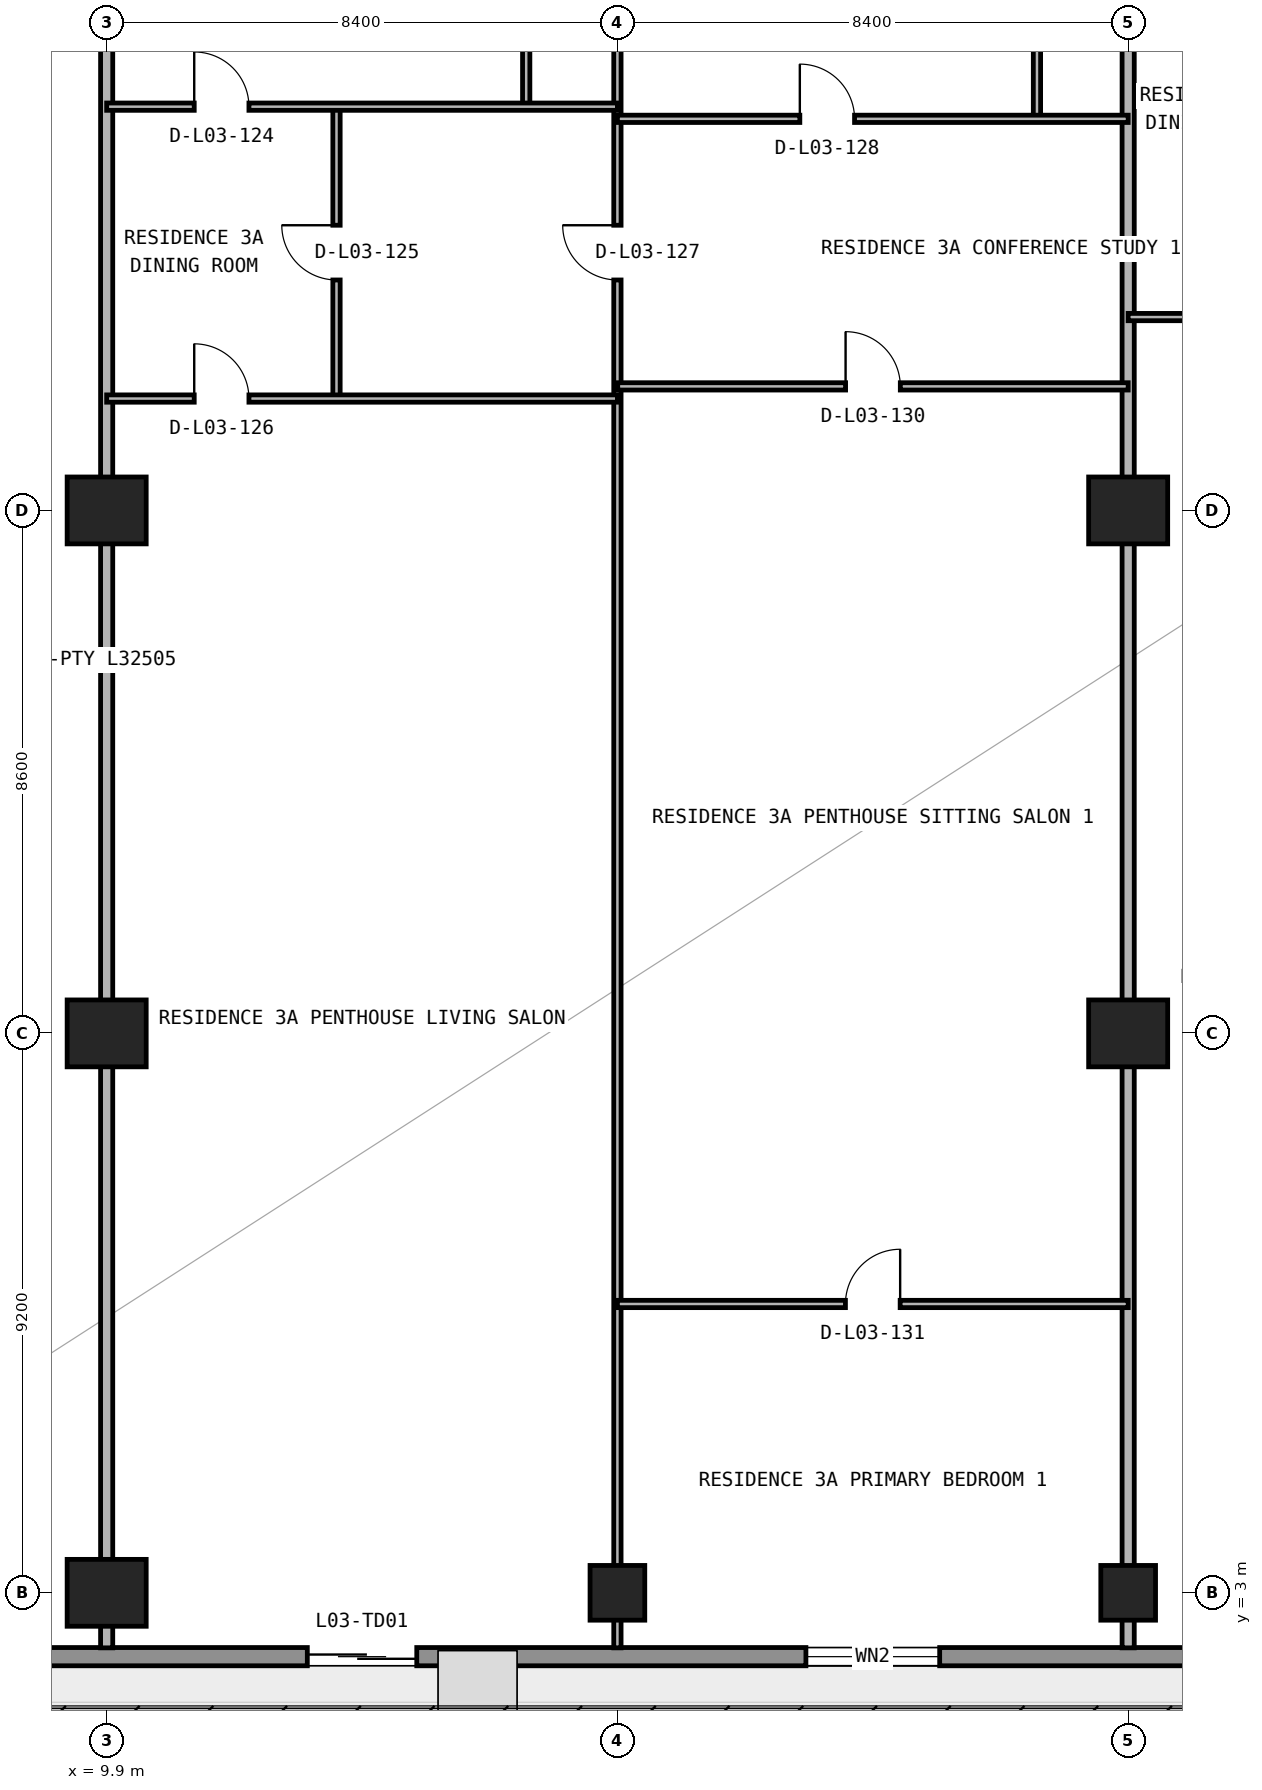
"""IFC4 building model, lengths in metres.
Left out: names, types, materials, properties, quantities, classifications, styles, units other than length and angle.
Written with IfcOpenShell. Run it as: python <this file> out.ifc"""

import sys

from ifc_helpers import new_model, si_unit, direction, frame, frame_2d, origin, origin_2d, place, context, subcontext, project, spatial, rectangle, circle, extrude, element, fill, save


model = new_model("IFC4")
c1 = context("Model", 3, precision=1e-05, world=origin(), true_north=direction((0.0, 1.0)))
c2 = subcontext(c1, "Body", "Model", "MODEL_VIEW")
j1 = project(units=[si_unit("LENGTHUNIT", "METRE"), si_unit("PLANEANGLEUNIT", "RADIAN")], contexts=[c1])
p1 = place(None, origin())
s1 = spatial("IfcSite", under=j1, at=p1, CompositionType="ELEMENT")
p2 = place(p1, origin())
s2 = spatial("IfcBuilding", under=s1, at=p2, CompositionType="ELEMENT")
p3 = place(p2, frame((0.0, 0.0, 15.0)))
s3 = spatial("IfcBuildingStorey", under=s2, at=p3, CompositionType="ELEMENT", Elevation=15.0)
p4 = place(p3, frame((9.9, 3.0, 0.0), z_axis=(0.0, 0.0, 1.0), x_axis=(1.0, 0.0, 0.0)))
e1 = element("IfcColumn", 1, at=p4, inside=s3, PredefinedType="COLUMN", context=c2, shape_type="SweptSolid", body=[
    extrude(rectangle(XDim=1.3, YDim=1.1, at=origin_2d()), origin(), (0.0, 0.0, 1.0), 4.5),
])
for number, where, z_axis, x_axis in (
    (2, (18.3, 3.0, 0.0), (0.0, 0.0, 1.0), (1.0, 0.0, 0.0)),
    (3, (26.7, 3.0, 0.0), (0.0, 0.0, 1.0), (1.0, 0.0, 0.0)),
):
    element("IfcColumn", number, at=place(p3, frame(where, z_axis=z_axis, x_axis=x_axis)), inside=s3, PredefinedType="COLUMN", context=c2, shape_type="SweptSolid", body=[
        extrude(circle(Radius=0.45, at=origin_2d()), origin(), (0.0, 0.0, 1.0), 4.5),
    ])
for number, where, z_axis, x_axis in (
    (4, (9.9, 12.2, 0.0), (0.0, 0.0, 1.0), (1.0, 0.0, 0.0)),
    (5, (26.7, 12.2, 0.0), (0.0, 0.0, 1.0), (1.0, 0.0, 0.0)),
    (6, (9.9, 20.8, 0.0), (0.0, 0.0, 1.0), (1.0, 0.0, 0.0)),
    (7, (26.7, 20.8, 0.0), (0.0, 0.0, 1.0), (1.0, 0.0, 0.0)),
):
    element("IfcColumn", number, at=place(p3, frame(where, z_axis=z_axis, x_axis=x_axis)), inside=s3, PredefinedType="COLUMN", context=c2, shape_type="SweptSolid", body=[
        extrude(rectangle(XDim=1.3, YDim=1.1, at=origin_2d()), origin(), (0.0, 0.0, 1.0), 4.5),
    ])
p5 = place(p3, frame((76.8, 1.95, 0.0), z_axis=(0.0, 0.0, 1.0), x_axis=(-1.0, 0.0, 0.0)))
e8 = element("IfcWall", 8, at=p5, inside=s3, PredefinedType="STANDARD", context=c2, shape_type="SweptSolid", body=[
    extrude(rectangle(XDim=75.8, YDim=0.3, at=frame_2d((37.9, 0.0))), origin(), (0.0, 0.0, 1.0), 4.5),
])
p6 = place(p5, frame((69.775, 0.0, 0.85)))
e9 = element("IfcOpeningElement", 9, at=p6, cuts=e8, PredefinedType="OPENING", context=c2, shape_type="SweptSolid", body=[
    extrude(rectangle(XDim=3.0, YDim=2.4, at=frame_2d((1.5, 1.2))), frame((0.0, 0.16, 0.0), z_axis=(0.0, -1.0, 0.0), x_axis=(1.0, 0.0, 0.0)), (0.0, 0.0, 1.0), 0.32),
])
p7 = place(p5, frame((61.8, 0.0, 0.0)))
e10 = element("IfcOpeningElement", 10, at=p7, cuts=e8, PredefinedType="OPENING", context=c2, shape_type="SweptSolid", body=[
    extrude(rectangle(XDim=1.8, YDim=2.3, at=frame_2d((0.9, 1.15))), frame((0.0, 0.16, 0.0), z_axis=(0.0, -1.0, 0.0), x_axis=(1.0, 0.0, 0.0)), (0.0, 0.0, 1.0), 0.32),
])
p8 = place(p5, frame((53.2, 0.0, 0.85)))
e11 = element("IfcOpeningElement", 11, at=p8, cuts=e8, PredefinedType="OPENING", context=c2, shape_type="SweptSolid", body=[
    extrude(rectangle(XDim=2.2, YDim=1.55, at=frame_2d((1.1, 0.775))), frame((0.0, 0.16, 0.0), z_axis=(0.0, -1.0, 0.0), x_axis=(1.0, 0.0, 0.0)), (0.0, 0.0, 1.0), 0.32),
])
p9 = place(p5, frame((45.0, 0.0, 0.0)))
e12 = element("IfcOpeningElement", 12, at=p9, cuts=e8, PredefinedType="OPENING", context=c2, shape_type="SweptSolid", body=[
    extrude(rectangle(XDim=1.8, YDim=2.3, at=frame_2d((0.9, 1.15))), frame((0.0, 0.16, 0.0), z_axis=(0.0, -1.0, 0.0), x_axis=(1.0, 0.0, 0.0)), (0.0, 0.0, 1.0), 0.32),
])
p10 = place(p5, frame((36.8, 0.0, 0.85)))
e13 = element("IfcOpeningElement", 13, at=p10, cuts=e8, PredefinedType="OPENING", context=c2, shape_type="SweptSolid", body=[
    extrude(rectangle(XDim=2.2, YDim=1.55, at=frame_2d((1.1, 0.775))), frame((0.0, 0.16, 0.0), z_axis=(0.0, -1.0, 0.0), x_axis=(1.0, 0.0, 0.0)), (0.0, 0.0, 1.0), 0.32),
])
p11 = place(p5, frame((28.8, 0.0, 0.85)))
e14 = element("IfcOpeningElement", 14, at=p11, cuts=e8, PredefinedType="OPENING", context=c2, shape_type="SweptSolid", body=[
    extrude(rectangle(XDim=2.2, YDim=1.55, at=frame_2d((1.1, 0.775))), frame((0.0, 0.16, 0.0), z_axis=(0.0, -1.0, 0.0), x_axis=(1.0, 0.0, 0.0)), (0.0, 0.0, 1.0), 0.32),
])
p12 = place(p5, frame((12.025, 0.0, 0.0)))
e15 = element("IfcOpeningElement", 15, at=p12, cuts=e8, PredefinedType="OPENING", context=c2, shape_type="SweptSolid", body=[
    extrude(rectangle(XDim=1.8, YDim=2.3, at=frame_2d((0.9, 1.15))), frame((0.0, 0.16, 0.0), z_axis=(0.0, -1.0, 0.0), x_axis=(1.0, 0.0, 0.0)), (0.0, 0.0, 1.0), 0.32),
])
p13 = place(p3, frame((9.9, 2.095, 0.0), z_axis=(0.0, 0.0, 1.0), x_axis=(0.0, 1.0, 0.0)))
e16 = element("IfcWall", 16, at=p13, inside=s3, PredefinedType="PARTITIONING", context=c2, shape_type="SweptSolid", body=[
    extrude(rectangle(XDim=32.505, YDim=0.2, at=frame_2d((16.252, 0.0))), origin(), (0.0, 0.0, 1.0), 3.464),
])
p14 = place(p3, frame((13.68, 22.64, 0.0), z_axis=(0.0, 0.0, 1.0), x_axis=(0.0, 1.0, 0.0)))
e17 = element("IfcWall", 17, at=p14, inside=s3, PredefinedType="PARTITIONING", context=c2, shape_type="SweptSolid", body=[
    extrude(rectangle(XDim=4.8, YDim=0.12, at=frame_2d((2.4, 0.0))), origin(), (0.0, 0.0, 1.0), 4.5),
])
p15 = place(p14, frame((1.95, 0.0, 0.0)))
e18 = element("IfcOpeningElement", 18, at=p15, cuts=e17, PredefinedType="OPENING", context=c2, shape_type="SweptSolid", body=[
    extrude(rectangle(XDim=0.9, YDim=2.15, at=frame_2d((0.45, 1.075))), frame((0.0, 0.07, 0.0), z_axis=(0.0, -1.0, 0.0), x_axis=(1.0, 0.0, 0.0)), (0.0, 0.0, 1.0), 0.14),
])
p16 = place(p3, frame((16.8, 27.44, 0.0), z_axis=(0.0, 0.0, 1.0), x_axis=(0.0, 1.0, 0.0)))
e19 = element("IfcWall", 19, at=p16, inside=s3, PredefinedType="PARTITIONING", context=c2, shape_type="SweptSolid", body=[
    extrude(rectangle(XDim=7.16, YDim=0.12, at=frame_2d((3.58, 0.0))), origin(), (0.0, 0.0, 1.0), 3.873),
])
p17 = place(p16, frame((3.155, 0.0, 0.0)))
e20 = element("IfcOpeningElement", 20, at=p17, cuts=e19, PredefinedType="OPENING", context=c2, shape_type="SweptSolid", body=[
    extrude(rectangle(XDim=0.85, YDim=2.1, at=frame_2d((0.425, 1.05))), frame((0.0, 0.07, 0.0), z_axis=(0.0, -1.0, 0.0), x_axis=(1.0, 0.0, 0.0)), (0.0, 0.0, 1.0), 0.14),
])
p18 = place(p3, frame((18.3, 2.095, 0.0), z_axis=(0.0, 0.0, 1.0), x_axis=(0.0, 1.0, 0.0)))
e21 = element("IfcWall", 21, at=p18, inside=s3, PredefinedType="PARTITIONING", context=c2, shape_type="SweptSolid", body=[
    extrude(rectangle(XDim=32.505, YDim=0.12, at=frame_2d((16.252, 0.0))), origin(), (0.0, 0.0, 1.0), 4.5),
])
p19 = place(p18, frame((22.495, 0.0, 0.0)))
e22 = element("IfcOpeningElement", 22, at=p19, cuts=e21, PredefinedType="OPENING", context=c2, shape_type="SweptSolid", body=[
    extrude(rectangle(XDim=0.9, YDim=2.15, at=frame_2d((0.45, 1.075))), frame((0.0, 0.07, 0.0), z_axis=(0.0, -1.0, 0.0), x_axis=(1.0, 0.0, 0.0)), (0.0, 0.0, 1.0), 0.14),
])
p20 = place(p3, frame((25.2, 27.24, 0.0), z_axis=(0.0, 0.0, 1.0), x_axis=(0.0, 1.0, 0.0)))
e23 = element("IfcWall", 23, at=p20, inside=s3, PredefinedType="PARTITIONING", context=c2, shape_type="SweptSolid", body=[
    extrude(rectangle(XDim=7.36, YDim=0.12, at=frame_2d((3.68, 0.0))), origin(), (0.0, 0.0, 1.0), 4.5),
])
p21 = place(p20, frame((3.255, 0.0, 0.0)))
e24 = element("IfcOpeningElement", 24, at=p21, cuts=e23, PredefinedType="OPENING", context=c2, shape_type="SweptSolid", body=[
    extrude(rectangle(XDim=0.85, YDim=2.1, at=frame_2d((0.425, 1.05))), frame((0.0, 0.07, 0.0), z_axis=(0.0, -1.0, 0.0), x_axis=(1.0, 0.0, 0.0)), (0.0, 0.0, 1.0), 0.14),
])
p22 = place(p3, frame((26.7, 2.095, 0.0), z_axis=(0.0, 0.0, 1.0), x_axis=(0.0, 1.0, 0.0)))
e25 = element("IfcWall", 25, at=p22, inside=s3, PredefinedType="PARTITIONING", context=c2, shape_type="SweptSolid", body=[
    extrude(rectangle(XDim=32.505, YDim=0.2, at=frame_2d((16.252, 0.0))), origin(), (0.0, 0.0, 1.0), 3.464),
])
p23 = place(p3, frame((18.3, 7.75, 0.0), z_axis=(0.0, 0.0, 1.0), x_axis=(1.0, 0.0, 0.0)))
e26 = element("IfcWall", 26, at=p23, inside=s3, PredefinedType="PARTITIONING", context=c2, shape_type="SweptSolid", body=[
    extrude(rectangle(XDim=8.4, YDim=0.12, at=frame_2d((4.2, 0.0))), origin(), (0.0, 0.0, 1.0), 4.5),
])
p24 = place(p23, frame((3.75, 0.0, 0.0)))
e27 = element("IfcOpeningElement", 27, at=p24, cuts=e26, PredefinedType="OPENING", context=c2, shape_type="SweptSolid", body=[
    extrude(rectangle(XDim=0.9, YDim=2.15, at=frame_2d((0.45, 1.075))), frame((0.0, 0.07, 0.0), z_axis=(0.0, -1.0, 0.0), x_axis=(1.0, 0.0, 0.0)), (0.0, 0.0, 1.0), 0.14),
])
p25 = place(p3, frame((9.9, 22.64, 0.0), z_axis=(0.0, 0.0, 1.0), x_axis=(1.0, 0.0, 0.0)))
e28 = element("IfcWall", 28, at=p25, inside=s3, PredefinedType="PARTITIONING", context=c2, shape_type="SweptSolid", body=[
    extrude(rectangle(XDim=8.4, YDim=0.12, at=frame_2d((4.2, 0.0))), origin(), (0.0, 0.0, 1.0), 4.5),
])
p26 = place(p25, frame((1.44, 0.0, 0.0)))
e29 = element("IfcOpeningElement", 29, at=p26, cuts=e28, PredefinedType="OPENING", context=c2, shape_type="SweptSolid", body=[
    extrude(rectangle(XDim=0.9, YDim=2.15, at=frame_2d((0.45, 1.075))), frame((0.0, 0.07, 0.0), z_axis=(0.0, -1.0, 0.0), x_axis=(1.0, 0.0, 0.0)), (0.0, 0.0, 1.0), 0.14),
])
p27 = place(p3, frame((18.305, 22.84, 0.0), z_axis=(0.0, 0.0, 1.0), x_axis=(1.0, 0.0, 0.0)))
e30 = element("IfcWall", 30, at=p27, inside=s3, PredefinedType="PARTITIONING", context=c2, shape_type="SweptSolid", body=[
    extrude(rectangle(XDim=8.395, YDim=0.12, at=frame_2d((4.198, 0.0))), origin(), (0.0, 0.0, 1.0), 4.5),
])
p28 = place(p27, frame((3.748, 0.0, 0.0)))
e31 = element("IfcOpeningElement", 31, at=p28, cuts=e30, PredefinedType="OPENING", context=c2, shape_type="SweptSolid", body=[
    extrude(rectangle(XDim=0.9, YDim=2.15, at=frame_2d((0.45, 1.075))), frame((0.0, 0.07, 0.0), z_axis=(0.0, -1.0, 0.0), x_axis=(1.0, 0.0, 0.0)), (0.0, 0.0, 1.0), 0.14),
])
p29 = place(p3, frame((26.7, 23.98, 0.0), z_axis=(0.0, 0.0, 1.0), x_axis=(1.0, 0.0, 0.0)))
e32 = element("IfcWall", 32, at=p29, inside=s3, PredefinedType="PARTITIONING", context=c2, shape_type="SweptSolid", body=[
    extrude(rectangle(XDim=8.4, YDim=0.12, at=frame_2d((4.2, 0.0))), origin(), (0.0, 0.0, 1.0), 4.5),
])
p30 = place(p29, frame((1.314, 0.0, 0.0)))
e33 = element("IfcOpeningElement", 33, at=p30, cuts=e32, PredefinedType="OPENING", context=c2, shape_type="SweptSolid", body=[
    extrude(rectangle(XDim=0.9, YDim=2.15, at=frame_2d((0.45, 1.075))), frame((0.0, 0.07, 0.0), z_axis=(0.0, -1.0, 0.0), x_axis=(1.0, 0.0, 0.0)), (0.0, 0.0, 1.0), 0.14),
])
p31 = place(p3, frame((18.3, 27.24, 0.0), z_axis=(0.0, 0.0, 1.0), x_axis=(1.0, 0.0, 0.0)))
e34 = element("IfcWall", 34, at=p31, inside=s3, PredefinedType="PARTITIONING", context=c2, shape_type="SweptSolid", body=[
    extrude(rectangle(XDim=8.4, YDim=0.12, at=frame_2d((4.2, 0.0))), origin(), (0.0, 0.0, 1.0), 4.5),
])
p32 = place(p31, frame((3.0, 0.0, 0.0)))
e35 = element("IfcOpeningElement", 35, at=p32, cuts=e34, PredefinedType="OPENING", context=c2, shape_type="SweptSolid", body=[
    extrude(rectangle(XDim=0.9, YDim=2.15, at=frame_2d((0.45, 1.075))), frame((0.0, 0.07, 0.0), z_axis=(0.0, -1.0, 0.0), x_axis=(1.0, 0.0, 0.0)), (0.0, 0.0, 1.0), 0.14),
])
p33 = place(p3, frame((9.9, 27.44, 0.0), z_axis=(0.0, 0.0, 1.0), x_axis=(1.0, 0.0, 0.0)))
e36 = element("IfcWall", 36, at=p33, inside=s3, PredefinedType="PARTITIONING", context=c2, shape_type="SweptSolid", body=[
    extrude(rectangle(XDim=8.4, YDim=0.12, at=frame_2d((4.2, 0.0))), origin(), (0.0, 0.0, 1.0), 4.5),
])
p34 = place(p33, frame((1.44, 0.0, 0.0)))
e37 = element("IfcOpeningElement", 37, at=p34, cuts=e36, PredefinedType="OPENING", context=c2, shape_type="SweptSolid", body=[
    extrude(rectangle(XDim=0.9, YDim=2.15, at=frame_2d((0.45, 1.075))), frame((0.0, 0.07, 0.0), z_axis=(0.0, -1.0, 0.0), x_axis=(1.0, 0.0, 0.0)), (0.0, 0.0, 1.0), 0.14),
])
p35 = place(p7, origin())
e38 = element("IfcDoor", 38, at=p35, inside=s3, OperationType="DOUBLE_DOOR_SLIDING", PredefinedType="DOOR", context=c2, shape_type="SweptSolid", body=[
    extrude(rectangle(XDim=1.8, YDim=2.3, at=frame_2d((0.9, 1.15))), frame((0.0, 0.025, 0.0), z_axis=(0.0, -1.0, 0.0), x_axis=(1.0, 0.0, 0.0)), (0.0, 0.0, 1.0), 0.05),
])
fill(e10, e38)
p36 = place(p8, origin())
e39 = element("IfcWindow", 39, at=p36, inside=s3, PartitioningType="SINGLE_PANEL", PredefinedType="WINDOW", context=c2, shape_type="SweptSolid", body=[
    extrude(rectangle(XDim=2.2, YDim=1.55, at=frame_2d((1.1, 0.775))), frame((0.0, 0.03, 0.0), z_axis=(0.0, -1.0, 0.0), x_axis=(1.0, 0.0, 0.0)), (0.0, 0.0, 1.0), 0.06),
])
fill(e11, e39)
p37 = place(p34, origin())
e40 = element("IfcDoor", 40, at=p37, inside=s3, OperationType="SINGLE_SWING_LEFT", PredefinedType="DOOR", context=c2, shape_type="SweptSolid", body=[
    extrude(rectangle(XDim=0.9, YDim=2.15, at=frame_2d((0.45, 1.075))), frame((0.0, 0.025, 0.0), z_axis=(0.0, -1.0, 0.0), x_axis=(1.0, 0.0, 0.0)), (0.0, 0.0, 1.0), 0.05),
])
fill(e37, e40)
p38 = place(p15, origin())
e41 = element("IfcDoor", 41, at=p38, inside=s3, OperationType="SINGLE_SWING_RIGHT", PredefinedType="DOOR", context=c2, shape_type="SweptSolid", body=[
    extrude(rectangle(XDim=0.9, YDim=2.15, at=frame_2d((0.45, 1.075))), frame((0.0, 0.025, 0.0), z_axis=(0.0, -1.0, 0.0), x_axis=(1.0, 0.0, 0.0)), (0.0, 0.0, 1.0), 0.05),
])
fill(e18, e41)
p39 = place(p26, origin())
e42 = element("IfcDoor", 42, at=p39, inside=s3, OperationType="SINGLE_SWING_LEFT", PredefinedType="DOOR", context=c2, shape_type="SweptSolid", body=[
    extrude(rectangle(XDim=0.9, YDim=2.15, at=frame_2d((0.45, 1.075))), frame((0.0, 0.025, 0.0), z_axis=(0.0, -1.0, 0.0), x_axis=(1.0, 0.0, 0.0)), (0.0, 0.0, 1.0), 0.05),
])
fill(e29, e42)
p40 = place(p19, origin())
e43 = element("IfcDoor", 43, at=p40, inside=s3, OperationType="SINGLE_SWING_RIGHT", PredefinedType="DOOR", context=c2, shape_type="SweptSolid", body=[
    extrude(rectangle(XDim=0.9, YDim=2.15, at=frame_2d((0.45, 1.075))), frame((0.0, 0.025, 0.0), z_axis=(0.0, -1.0, 0.0), x_axis=(1.0, 0.0, 0.0)), (0.0, 0.0, 1.0), 0.05),
])
fill(e22, e43)
p41 = place(p32, origin())
e44 = element("IfcDoor", 44, at=p41, inside=s3, OperationType="SINGLE_SWING_LEFT", PredefinedType="DOOR", context=c2, shape_type="SweptSolid", body=[
    extrude(rectangle(XDim=0.9, YDim=2.15, at=frame_2d((0.45, 1.075))), frame((0.0, 0.025, 0.0), z_axis=(0.0, -1.0, 0.0), x_axis=(1.0, 0.0, 0.0)), (0.0, 0.0, 1.0), 0.05),
])
fill(e35, e44)
p42 = place(p28, origin())
e45 = element("IfcDoor", 45, at=p42, inside=s3, OperationType="SINGLE_SWING_LEFT", PredefinedType="DOOR", context=c2, shape_type="SweptSolid", body=[
    extrude(rectangle(XDim=0.9, YDim=2.15, at=frame_2d((0.45, 1.075))), frame((0.0, 0.025, 0.0), z_axis=(0.0, -1.0, 0.0), x_axis=(1.0, 0.0, 0.0)), (0.0, 0.0, 1.0), 0.05),
])
fill(e31, e45)
p43 = place(p24, origin())
e46 = element("IfcDoor", 46, at=p43, inside=s3, OperationType="SINGLE_SWING_RIGHT", PredefinedType="DOOR", context=c2, shape_type="SweptSolid", body=[
    extrude(rectangle(XDim=0.9, YDim=2.15, at=frame_2d((0.45, 1.075))), frame((0.0, 0.025, 0.0), z_axis=(0.0, -1.0, 0.0), x_axis=(1.0, 0.0, 0.0)), (0.0, 0.0, 1.0), 0.05),
])
fill(e27, e46)
save(model, sys.argv[1])
